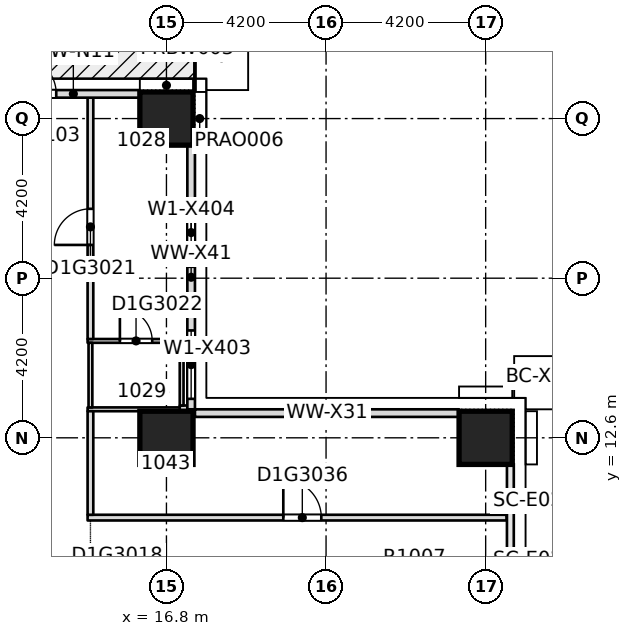
"""IFC4 building model, lengths in metres.
Left out: names, types, materials, properties, quantities, classifications, styles, units other than length and angle.
Written with IfcOpenShell. Run it as: python <this file> out.ifc"""

import sys

from ifc_helpers import new_model, si_unit, direction, frame, frame_2d, origin, origin_2d, place, context, subcontext, project, spatial, rectangle, extrude, element, fill, save


model = new_model("IFC4")
c1 = context("Model", 3, precision=1e-05, world=origin(), true_north=direction((0.0, 1.0)))
c2 = subcontext(c1, "Body", "Model", "MODEL_VIEW")
j1 = project(units=[si_unit("LENGTHUNIT", "METRE"), si_unit("PLANEANGLEUNIT", "RADIAN")], contexts=[c1])
p1 = place(None, origin())
s1 = spatial("IfcSite", under=j1, at=p1, CompositionType="ELEMENT")
p2 = place(p1, origin())
s2 = spatial("IfcBuilding", under=s1, at=p2, CompositionType="ELEMENT")
p3 = place(p2, frame((0.0, 0.0, 48.3)))
s3 = spatial("IfcBuildingStorey", under=s2, at=p3, CompositionType="ELEMENT", Elevation=48.3)
for number, where, z_axis, x_axis in (
    (1, (16.8, 12.6, -0.32), (0.0, 0.0, 1.0), (1.0, 0.0, 0.0)),
    (2, (25.2, 12.6, -0.32), (0.0, 0.0, 1.0), (1.0, 0.0, 0.0)),
    (3, (16.8, 21.0, -0.32), (0.0, 0.0, 1.0), (1.0, 0.0, 0.0)),
):
    element("IfcColumn", number, at=place(p3, frame(where, z_axis=z_axis, x_axis=x_axis)), inside=s3, PredefinedType="COLUMN", context=c2, shape_type="SweptSolid", body=[
        extrude(rectangle(XDim=1.4, YDim=1.4, at=origin_2d()), origin(), (0.0, 0.0, 1.0), 3.45),
    ])
p4 = place(p3, frame((14.725, 10.5, 0.0), z_axis=(0.0, 0.0, 1.0), x_axis=(1.0, 0.0, 0.0)))
e4 = element("IfcWall", 4, at=p4, inside=s3, PredefinedType="PARTITIONING", context=c2, shape_type="SweptSolid", body=[
    extrude(rectangle(XDim=11.025, YDim=0.15, at=frame_2d((5.512, 0.0))), origin(), (0.0, 0.0, 1.0), 3.13),
])
p5 = place(p4, frame((5.15, 0.0, 0.0)))
e5 = element("IfcOpeningElement", 5, at=p5, cuts=e4, PredefinedType="OPENING", context=c2, shape_type="SweptSolid", body=[
    extrude(rectangle(XDim=1.0, YDim=2.1, at=frame_2d((0.5, 1.05))), frame((0.0, 0.085, 0.0), z_axis=(0.0, -1.0, 0.0), x_axis=(1.0, 0.0, 0.0)), (0.0, 0.0, 1.0), 0.17),
])
p6 = place(p3, frame((14.725, 13.35, 0.0), z_axis=(0.0, 0.0, 1.0), x_axis=(1.0, 0.0, 0.0)))
e6 = element("IfcWall", 6, at=p6, inside=s3, PredefinedType="PARTITIONING", context=c2, shape_type="SweptSolid", body=[
    extrude(rectangle(XDim=2.525, YDim=0.1, at=frame_2d((1.262, 0.0))), origin(), (0.0, 0.0, 1.0), 3.13),
])
p7 = place(p3, frame((17.15, 13.35, 0.0), z_axis=(0.0, 0.0, 1.0), x_axis=(1.0, 0.0, 0.0)))
e7 = element("IfcWall", 7, at=p7, inside=s3, PredefinedType="PARTITIONING", context=c2, shape_type="SweptSolid", body=[
    extrude(rectangle(XDim=0.2, YDim=0.2, at=frame_2d((0.1, 0.0))), origin(), (0.0, 0.0, 1.0), 3.13),
])
p8 = place(p3, frame((14.725, 15.15, 0.0), z_axis=(0.0, 0.0, 1.0), x_axis=(1.0, 0.0, 0.0)))
e8 = element("IfcWall", 8, at=p8, inside=s3, PredefinedType="PARTITIONING", context=c2, shape_type="SweptSolid", body=[
    extrude(rectangle(XDim=2.525, YDim=0.1, at=frame_2d((1.262, 0.0))), origin(), (0.0, 0.0, 1.0), 3.13),
])
p9 = place(p8, frame((0.85, 0.0, 0.0)))
e9 = element("IfcOpeningElement", 9, at=p9, cuts=e8, PredefinedType="OPENING", context=c2, shape_type="SweptSolid", body=[
    extrude(rectangle(XDim=0.85, YDim=2.1, at=frame_2d((0.425, 1.05))), frame((0.0, 0.06, 0.0), z_axis=(0.0, -1.0, 0.0), x_axis=(1.0, 0.0, 0.0)), (0.0, 0.0, 1.0), 0.12),
])
p10 = place(p3, frame((14.8, 10.575, 0.0), z_axis=(0.0, 0.0, 1.0), x_axis=(0.0, 1.0, 0.0)))
e10 = element("IfcWall", 10, at=p10, inside=s3, PredefinedType="PARTITIONING", context=c2, shape_type="SweptSolid", body=[
    extrude(rectangle(XDim=2.725, YDim=0.15, at=frame_2d((1.363, 0.0))), origin(), (0.0, 0.0, 1.0), 3.13),
])
p11 = place(p3, frame((14.8, 13.4, 0.0), z_axis=(0.0, 0.0, 1.0), x_axis=(0.0, 1.0, 0.0)))
e11 = element("IfcWall", 11, at=p11, inside=s3, PredefinedType="PARTITIONING", context=c2, shape_type="SweptSolid", body=[
    extrude(rectangle(XDim=1.7, YDim=0.1, at=frame_2d((0.85, 0.0))), origin(), (0.0, 0.0, 1.0), 3.13),
])
p12 = place(p3, frame((14.8, 15.2, 0.0), z_axis=(0.0, 0.0, 1.0), x_axis=(0.0, 1.0, 0.0)))
e12 = element("IfcWall", 12, at=p12, inside=s3, PredefinedType="PARTITIONING", context=c2, shape_type="SweptSolid", body=[
    extrude(rectangle(XDim=6.35, YDim=0.15, at=frame_2d((3.175, 0.0))), origin(), (0.0, 0.0, 1.0), 3.13),
])
p13 = place(p12, frame((2.475, 0.0, 0.0)))
e13 = element("IfcOpeningElement", 13, at=p13, cuts=e12, PredefinedType="OPENING", context=c2, shape_type="SweptSolid", body=[
    extrude(rectangle(XDim=0.95, YDim=2.1, at=frame_2d((0.475, 1.05))), frame((0.0, 0.085, 0.0), z_axis=(0.0, -1.0, 0.0), x_axis=(1.0, 0.0, 0.0)), (0.0, 0.0, 1.0), 0.17),
])
p14 = place(p3, frame((17.2, 13.45, 0.0), z_axis=(0.0, 0.0, 1.0), x_axis=(0.0, 1.0, 0.0)))
e14 = element("IfcWall", 14, at=p14, inside=s3, PredefinedType="PARTITIONING", context=c2, shape_type="SweptSolid", body=[
    extrude(rectangle(XDim=1.65, YDim=0.1, at=frame_2d((0.825, 0.0))), origin(), (0.0, 0.0, 1.0), 3.13),
])
p15 = place(p3, frame((24.5, 13.25, 0.0), z_axis=(0.0, 0.0, 1.0), x_axis=(-1.0, 0.0, 0.0)))
e15 = element("IfcWall", 15, at=p15, inside=s3, PredefinedType="STANDARD", context=c2, shape_type="SweptSolid", body=[
    extrude(rectangle(XDim=6.95, YDim=0.2, at=frame_2d((3.475, 0.0))), origin(), (0.0, 0.0, 1.0), 3.13),
])
p16 = place(p3, frame((17.45, 13.35, 0.0), z_axis=(0.0, 0.0, 1.0), x_axis=(0.0, 1.0, 0.0)))
e16 = element("IfcWall", 16, at=p16, inside=s3, PredefinedType="STANDARD", context=c2, shape_type="SweptSolid", body=[
    extrude(rectangle(XDim=6.95, YDim=0.2, at=frame_2d((3.475, 0.0))), origin(), (0.0, 0.0, 1.0), 3.13),
])
p17 = place(p16, frame((0.275, 0.0, 0.2)))
e17 = element("IfcOpeningElement", 17, at=p17, cuts=e16, PredefinedType="OPENING", context=c2, shape_type="SweptSolid", body=[
    extrude(rectangle(XDim=1.8, YDim=2.65, at=frame_2d((0.9, 1.325))), frame((0.0, 0.11, 0.0), z_axis=(0.0, -1.0, 0.0), x_axis=(1.0, 0.0, 0.0)), (0.0, 0.0, 1.0), 0.22),
])
p18 = place(p16, frame((3.75, 0.0, 0.2)))
e18 = element("IfcOpeningElement", 18, at=p18, cuts=e16, PredefinedType="OPENING", context=c2, shape_type="SweptSolid", body=[
    extrude(rectangle(XDim=1.8, YDim=2.65, at=frame_2d((0.9, 1.325))), frame((0.0, 0.11, 0.0), z_axis=(0.0, -1.0, 0.0), x_axis=(1.0, 0.0, 0.0)), (0.0, 0.0, 1.0), 0.22),
])
p19 = place(p3, frame((16.1, 21.65, 0.0), z_axis=(0.0, 0.0, 1.0), x_axis=(-1.0, 0.0, 0.0)))
e19 = element("IfcWall", 19, at=p19, inside=s3, PredefinedType="STANDARD", context=c2, shape_type="SweptSolid", body=[
    extrude(rectangle(XDim=3.5, YDim=0.2, at=frame_2d((1.75, 0.0))), origin(), (0.0, 0.0, 1.0), 3.13),
])
p20 = place(p19, frame((2.2, 0.0, 0.0)))
e20 = element("IfcOpeningElement", 20, at=p20, cuts=e19, PredefinedType="OPENING", context=c2, shape_type="SweptSolid", body=[
    extrude(rectangle(XDim=1.0, YDim=2.4, at=frame_2d((0.5, 1.2))), frame((0.0, 0.11, 0.0), z_axis=(0.0, -1.0, 0.0), x_axis=(1.0, 0.0, 0.0)), (0.0, 0.0, 1.0), 0.22),
])
p21 = place(p13, origin())
e21 = element("IfcDoor", 21, at=p21, inside=s3, OperationType="SINGLE_SWING_LEFT", PredefinedType="DOOR", context=c2, shape_type="SweptSolid", body=[
    extrude(rectangle(XDim=0.95, YDim=2.1, at=frame_2d((0.475, 1.05))), frame((0.0, 0.025, 0.0), z_axis=(0.0, -1.0, 0.0), x_axis=(1.0, 0.0, 0.0)), (0.0, 0.0, 1.0), 0.05),
])
fill(e13, e21)
p22 = place(p9, origin())
e22 = element("IfcDoor", 22, at=p22, inside=s3, OperationType="SINGLE_SWING_RIGHT", PredefinedType="DOOR", context=c2, shape_type="SweptSolid", body=[
    extrude(rectangle(XDim=0.85, YDim=2.1, at=frame_2d((0.425, 1.05))), frame((0.0, 0.025, 0.0), z_axis=(0.0, -1.0, 0.0), x_axis=(1.0, 0.0, 0.0)), (0.0, 0.0, 1.0), 0.05),
])
fill(e9, e22)
p23 = place(p5, origin())
e23 = element("IfcDoor", 23, at=p23, inside=s3, OperationType="SINGLE_SWING_RIGHT", PredefinedType="DOOR", context=c2, shape_type="SweptSolid", body=[
    extrude(rectangle(XDim=1.0, YDim=2.1, at=frame_2d((0.5, 1.05))), frame((0.0, 0.025, 0.0), z_axis=(0.0, -1.0, 0.0), x_axis=(1.0, 0.0, 0.0)), (0.0, 0.0, 1.0), 0.05),
])
fill(e5, e23)
p24 = place(p17, origin())
e24 = element("IfcWindow", 24, at=p24, inside=s3, PartitioningType="SINGLE_PANEL", PredefinedType="WINDOW", context=c2, shape_type="SweptSolid", body=[
    extrude(rectangle(XDim=1.8, YDim=2.65, at=frame_2d((0.9, 1.325))), frame((0.0, 0.03, 0.0), z_axis=(0.0, -1.0, 0.0), x_axis=(1.0, 0.0, 0.0)), (0.0, 0.0, 1.0), 0.06),
])
fill(e17, e24)
p25 = place(p18, origin())
e25 = element("IfcWindow", 25, at=p25, inside=s3, PartitioningType="SINGLE_PANEL", PredefinedType="WINDOW", context=c2, shape_type="SweptSolid", body=[
    extrude(rectangle(XDim=1.8, YDim=2.65, at=frame_2d((0.9, 1.325))), frame((0.0, 0.03, 0.0), z_axis=(0.0, -1.0, 0.0), x_axis=(1.0, 0.0, 0.0)), (0.0, 0.0, 1.0), 0.06),
])
fill(e18, e25)
p26 = place(p20, origin())
e26 = element("IfcDoor", 26, at=p26, inside=s3, OperationType="SINGLE_SWING_LEFT", PredefinedType="DOOR", context=c2, shape_type="SweptSolid", body=[
    extrude(rectangle(XDim=1.0, YDim=2.4, at=frame_2d((0.5, 1.2))), frame((0.0, 0.025, 0.0), z_axis=(0.0, -1.0, 0.0), x_axis=(1.0, 0.0, 0.0)), (0.0, 0.0, 1.0), 0.05),
])
fill(e20, e26)
save(model, sys.argv[1])
